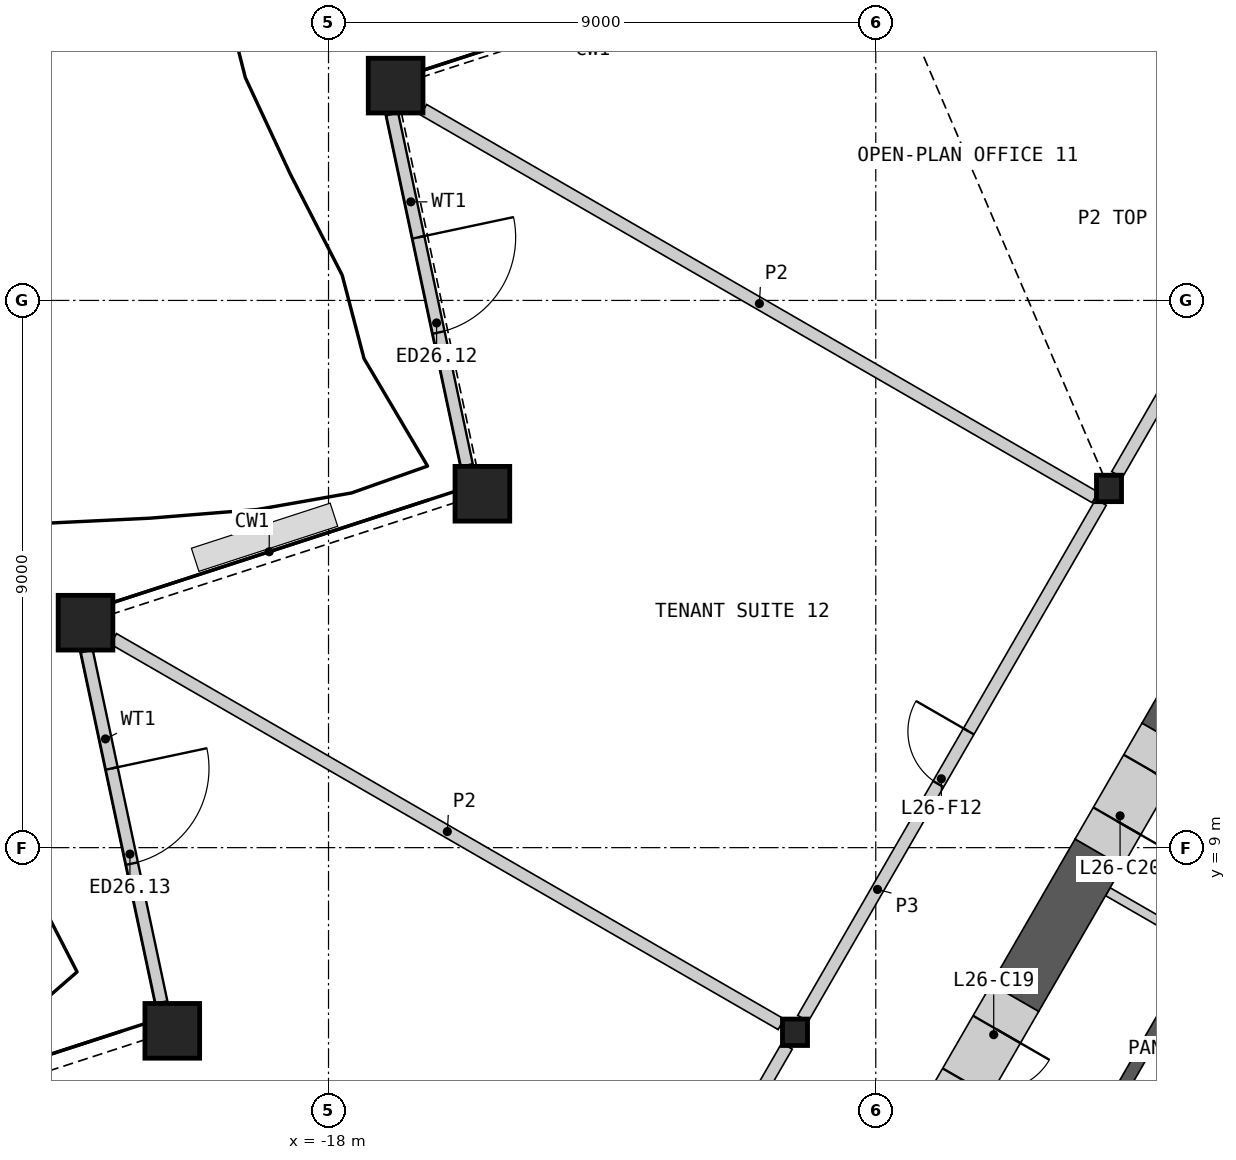
"""IFC4 building model, lengths in metres.
Left out: names, types, materials, properties, quantities, classifications, styles, units other than length and angle.
Written with IfcOpenShell. Run it as: python <this file> out.ifc"""

import sys

from ifc_helpers import new_model, si_unit, direction, frame, frame_2d, origin, origin_2d, place, context, subcontext, project, spatial, polyline, rectangle, hollow_rectangle, i_section, outline, extrude, element, fill, save


model = new_model("IFC4")
c1 = context("Model", 3, precision=1e-05, world=origin(), true_north=direction((0.0, 1.0)))
c2 = subcontext(c1, "Body", "Model", "MODEL_VIEW")
j1 = project(units=[si_unit("LENGTHUNIT", "METRE"), si_unit("PLANEANGLEUNIT", "RADIAN")], contexts=[c1])
p1 = place(None, origin())
s1 = spatial("IfcSite", under=j1, at=p1, CompositionType="ELEMENT")
p2 = place(p1, origin())
s2 = spatial("IfcBuilding", under=s1, at=p2, CompositionType="ELEMENT")
p3 = place(p2, frame((0.0, 0.0, 124.8)))
s3 = spatial("IfcBuildingStorey", under=s2, at=p3, CompositionType="ELEMENT", Elevation=124.8)
for number, where, z_axis, x_axis in (
    (1, (-16.896, 21.533, 0.0), (0.0, 0.0, 1.0), (1.0, 0.0, 0.0)),
    (2, (-15.469, 14.82, 0.0), (0.0, 0.0, 1.0), (1.0, 0.0, 0.0)),
    (3, (-21.996, 12.699, 0.0), (0.0, 0.0, 1.0), (1.0, 0.0, 0.0)),
    (4, (-20.57, 5.987, 0.0), (0.0, 0.0, 1.0), (1.0, 0.0, 0.0)),
):
    element("IfcColumn", number, at=place(p3, frame(where, z_axis=z_axis, x_axis=x_axis)), inside=s3, PredefinedType="COLUMN", context=c2, shape_type="SweptSolid", body=[
        extrude(hollow_rectangle(XDim=0.9, YDim=0.9, WallThickness=0.06, at=origin_2d()), origin(), (0.0, 0.0, 1.0), 4.2),
    ])
for number, where, z_axis, x_axis in (
    (5, (-5.164, 14.908, 0.0), (0.0, 0.0, 1.0), (1.0, 0.0, 0.0)),
    (6, (-10.328, 5.963, 0.0), (0.0, 0.0, 1.0), (1.0, 0.0, 0.0)),
):
    element("IfcColumn", number, at=place(p3, frame(where, z_axis=z_axis, x_axis=x_axis)), inside=s3, PredefinedType="COLUMN", context=c2, shape_type="SweptSolid", body=[
        extrude(i_section(OverallWidth=0.412, OverallDepth=0.435, WebThickness=0.036, FlangeThickness=0.057, at=origin_2d()), origin(), (0.0, 0.0, 1.0), 4.2),
    ])
p4 = place(p3, frame((-16.953, 21.066, 0.0), z_axis=(0.0, 0.0, 1.0), x_axis=(0.207917562075, -0.978146352741, 0.0)))
e7 = element("IfcWall", 7, at=p4, inside=s3, PredefinedType="SOLIDWALL", context=c2, shape_type="SweptSolid", body=[
    extrude(rectangle(XDim=5.909, YDim=0.2, at=frame_2d((2.954, 0.0))), origin(), (0.0, 0.0, 1.0), 3.189),
])
p5 = place(p4, frame((2.073, 0.0, 0.0)))
e8 = element("IfcOpeningElement", 8, at=p5, cuts=e7, PredefinedType="OPENING", context=c2, shape_type="SweptSolid", body=[
    extrude(rectangle(XDim=1.6, YDim=2.4, at=frame_2d((0.8, 1.2))), frame((0.0, 0.11, 0.0), z_axis=(0.0, -1.0, 0.0), x_axis=(1.0, 0.0, 0.0)), (0.0, 0.0, 1.0), 0.22),
])
p6 = place(p3, frame((-21.976, 12.233, 0.0), z_axis=(0.0, 0.0, 1.0), x_axis=(0.207925965623, -0.978144566421, 0.0)))
e9 = element("IfcWall", 9, at=p6, inside=s3, PredefinedType="SOLIDWALL", context=c2, shape_type="SweptSolid", body=[
    extrude(rectangle(XDim=5.908, YDim=0.2, at=frame_2d((2.954, 0.0))), origin(), (0.0, 0.0, 1.0), 3.189),
])
p7 = place(p6, frame((1.973, 0.0, 0.0)))
e10 = element("IfcOpeningElement", 10, at=p7, cuts=e9, PredefinedType="OPENING", context=c2, shape_type="SweptSolid", body=[
    extrude(rectangle(XDim=1.6, YDim=2.4, at=frame_2d((0.8, 1.2))), frame((0.0, 0.11, 0.0), z_axis=(0.0, -1.0, 0.0), x_axis=(1.0, 0.0, 0.0)), (0.0, 0.0, 1.0), 0.22),
])
p8 = place(p3, origin())
e11 = element("IfcWall", 11, at=p8, inside=s3, PredefinedType="SHEAR", context=c2, shape_type="SweptSolid", body=[
    extrude(outline(polyline([(-4.96, 0.208), (-7.131, 1.461), (-3.731, 7.35), (-1.561, 6.097), (-1.66, 5.924), (-3.652, 7.074), (-5.752, 3.437), (-3.76, 2.287), (-3.861, 2.113), (-5.852, 3.263), (-6.852, 1.531), (-4.861, 0.381), (-4.96, 0.208)])), origin(), (0.0, 0.0, 1.0), 3.8),
])
p9 = place(p3, frame((-1.631, 5.776, 0.0), z_axis=(0.0, 0.0, 1.0), x_axis=(-0.499992876559, -0.866029516466, 0.0)))
e12 = element("IfcWall", 12, at=p9, inside=s3, PredefinedType="SOLIDWALL", context=c2, shape_type="SweptSolid", body=[
    extrude(rectangle(XDim=6.486, YDim=0.2, at=frame_2d((3.243, 0.0))), origin(), (0.0, 0.0, 1.0), 3.8),
])
p10 = place(p9, frame((1.537, 0.0, 0.0)))
e13 = element("IfcOpeningElement", 13, at=p10, cuts=e12, PredefinedType="OPENING", context=c2, shape_type="SweptSolid", body=[
    extrude(rectangle(XDim=0.9, YDim=2.1, at=frame_2d((0.45, 1.05))), frame((0.0, 0.11, 0.0), z_axis=(0.0, -1.0, 0.0), x_axis=(1.0, 0.0, 0.0)), (0.0, 0.0, 1.0), 0.22),
])
p11 = place(p3, frame((-3.693, 7.415, 0.0), z_axis=(0.0, 0.0, 1.0), x_axis=(-0.866024871741, 0.500000921525, 0.0)))
e14 = element("IfcWall", 14, at=p11, inside=s3, PredefinedType="PARTITIONING", context=c2, shape_type="SweptSolid", body=[
    extrude(rectangle(XDim=1.72, YDim=0.15, at=frame_2d((0.86, 0.0))), origin(), (0.0, 0.0, 1.0), 3.8),
])
p12 = place(p3, frame((-0.39, 17.478, 0.0), z_axis=(0.0, 0.0, 1.0), x_axis=(-0.500010285023, -0.866019465642, 0.0)))
e15 = element("IfcWall", 15, at=p12, inside=s3, PredefinedType="SHEAR", context=c2, shape_type="SweptSolid", body=[
    extrude(rectangle(XDim=7.685, YDim=0.9, at=frame_2d((3.842, 0.0))), origin(), (0.0, 0.0, 1.0), 3.8),
])
p13 = place(p3, frame((-5.332, 8.917, 0.0), z_axis=(0.0, 0.0, 1.0), x_axis=(-0.499949934511, -0.866054307178, 0.0)))
e16 = element("IfcWall", 16, at=p13, inside=s3, PredefinedType="SHEAR", context=c2, shape_type="SweptSolid", body=[
    extrude(rectangle(XDim=2.756, YDim=0.9, at=frame_2d((1.378, 0.0))), origin(), (0.0, 0.0, 1.0), 3.8),
])
p14 = place(p3, frame((-6.71, 6.53, 0.0), z_axis=(0.0, 0.0, 1.0), x_axis=(-0.50002983664, -0.866008176907, 0.0)))
e17 = element("IfcWall", 17, at=p14, inside=s3, PredefinedType="SHEAR", context=c2, shape_type="SweptSolid", body=[
    extrude(rectangle(XDim=2.2, YDim=0.9, at=frame_2d((1.1, 0.0))), origin(), (0.0, 0.0, 1.0), 3.8),
])
p15 = place(p14, frame((0.6, 0.0, 0.0)))
e18 = element("IfcOpeningElement", 18, at=p15, cuts=e17, PredefinedType="OPENING", context=c2, shape_type="SweptSolid", body=[
    extrude(rectangle(XDim=1.0, YDim=2.1, at=frame_2d((0.5, 1.05))), frame((0.0, 0.46, 0.0), z_axis=(0.0, -1.0, 0.0), x_axis=(1.0, 0.0, 0.0)), (0.0, 0.0, 1.0), 0.92),
])
p16 = place(p3, frame((-4.232, 10.822, 0.0), z_axis=(0.0, 0.0, 1.0), x_axis=(-0.50002983664, -0.866008176907, 0.0)))
e19 = element("IfcWall", 19, at=p16, inside=s3, PredefinedType="SHEAR", context=c2, shape_type="SweptSolid", body=[
    extrude(rectangle(XDim=2.2, YDim=0.9, at=frame_2d((1.1, 0.0))), origin(), (0.0, 0.0, 1.0), 3.8),
])
p17 = place(p16, frame((0.6, 0.0, 0.0)))
e20 = element("IfcOpeningElement", 20, at=p17, cuts=e19, PredefinedType="OPENING", context=c2, shape_type="SweptSolid", body=[
    extrude(rectangle(XDim=1.0, YDim=2.1, at=frame_2d((0.5, 1.05))), frame((0.0, 0.46, 0.0), z_axis=(0.0, -1.0, 0.0), x_axis=(1.0, 0.0, 0.0)), (0.0, 0.0, 1.0), 0.92),
])
p18 = place(p3, frame((-15.361, -2.754, 0.0), z_axis=(0.0, 0.0, 1.0), x_axis=(0.500004141693, 0.866023012564, 0.0)))
e21 = element("IfcWall", 21, at=p18, inside=s3, PredefinedType="PARTITIONING", context=c2, shape_type="SweptSolid", body=[
    extrude(rectangle(XDim=9.803, YDim=0.2, at=frame_2d((4.902, 0.0))), origin(), (0.0, 0.0, 1.0), 3.8),
])
p19 = place(p18, frame((4.452, 0.0, 0.0)))
e22 = element("IfcOpeningElement", 22, at=p19, cuts=e21, PredefinedType="OPENING", context=c2, shape_type="SweptSolid", body=[
    extrude(rectangle(XDim=1.0, YDim=2.1, at=frame_2d((0.5, 1.05))), frame((0.0, 0.11, 0.0), z_axis=(0.0, -1.0, 0.0), x_axis=(1.0, 0.0, 0.0)), (0.0, 0.0, 1.0), 0.22),
])
p20 = place(p3, frame((-10.197, 6.19, 0.0), z_axis=(0.0, 0.0, 1.0), x_axis=(0.500012035596, 0.866018454918, 0.0)))
e23 = element("IfcWall", 23, at=p20, inside=s3, PredefinedType="PARTITIONING", context=c2, shape_type="SweptSolid", body=[
    extrude(rectangle(XDim=9.803, YDim=0.2, at=frame_2d((4.902, 0.0))), origin(), (0.0, 0.0, 1.0), 3.8),
])
p21 = place(p20, frame((4.452, 0.0, 0.0)))
e24 = element("IfcOpeningElement", 24, at=p21, cuts=e23, PredefinedType="OPENING", context=c2, shape_type="SweptSolid", body=[
    extrude(rectangle(XDim=1.0, YDim=2.1, at=frame_2d((0.5, 1.05))), frame((0.0, 0.11, 0.0), z_axis=(0.0, -1.0, 0.0), x_axis=(1.0, 0.0, 0.0)), (0.0, 0.0, 1.0), 0.22),
])
p22 = place(p3, frame((-5.033, 15.135, 0.0), z_axis=(0.0, 0.0, 1.0), x_axis=(0.499980978912, 0.866036385336, 0.0)))
e25 = element("IfcWall", 25, at=p22, inside=s3, PredefinedType="PARTITIONING", context=c2, shape_type="SweptSolid", body=[
    extrude(rectangle(XDim=6.24, YDim=0.2, at=frame_2d((3.12, 0.0))), origin(), (0.0, 0.0, 1.0), 3.8),
])
p23 = place(p22, frame((2.57, 0.0, 0.0)))
e26 = element("IfcOpeningElement", 26, at=p23, cuts=e25, PredefinedType="OPENING", context=c2, shape_type="SweptSolid", body=[
    extrude(rectangle(XDim=1.0, YDim=2.1, at=frame_2d((0.5, 1.05))), frame((0.0, 0.11, 0.0), z_axis=(0.0, -1.0, 0.0), x_axis=(1.0, 0.0, 0.0)), (0.0, 0.0, 1.0), 0.22),
])
p24 = place(p3, frame((-11.737, 29.906, 0.0), z_axis=(0.0, 0.0, 1.0), x_axis=(0.718783474817, -0.695234001132, 0.0)))
e27 = element("IfcWall", 27, at=p24, inside=s3, PredefinedType="PARTITIONING", context=c2, shape_type="SweptSolid", body=[
    extrude(rectangle(XDim=13.498, YDim=0.2, at=frame_2d((6.749, 0.0))), origin(), (0.0, 0.0, 1.0), 2.885),
])
p25 = place(p3, frame((-16.436, 21.137, 0.0), z_axis=(0.0, 0.0, 1.0), x_axis=(0.866023321739, -0.500003606191, 0.0)))
e28 = element("IfcWall", 28, at=p25, inside=s3, PredefinedType="PARTITIONING", context=c2, shape_type="SweptSolid", body=[
    extrude(rectangle(XDim=12.753, YDim=0.2, at=frame_2d((6.377, 0.0))), origin(), (0.0, 0.0, 1.0), 2.885),
])
p26 = place(p3, frame((-21.536, 12.434, 0.0), z_axis=(0.0, 0.0, 1.0), x_axis=(0.86602461759, -0.500001361726, 0.0)))
e29 = element("IfcWall", 29, at=p26, inside=s3, PredefinedType="PARTITIONING", context=c2, shape_type="SweptSolid", body=[
    extrude(rectangle(XDim=12.679, YDim=0.2, at=frame_2d((6.34, 0.0))), origin(), (0.0, 0.0, 1.0), 2.885),
])
p27 = place(p5, origin())
e30 = element("IfcDoor", 30, at=p27, inside=s3, OperationType="DOUBLE_DOOR_SINGLE_SWING", PredefinedType="DOOR", context=c2, shape_type="SweptSolid", body=[
    extrude(rectangle(XDim=1.6, YDim=2.4, at=frame_2d((0.8, 1.2))), frame((0.0, 0.025, 0.0), z_axis=(0.0, -1.0, 0.0), x_axis=(1.0, 0.0, 0.0)), (0.0, 0.0, 1.0), 0.05),
])
fill(e8, e30)
p28 = place(p7, origin())
e31 = element("IfcDoor", 31, at=p28, inside=s3, OperationType="DOUBLE_DOOR_SINGLE_SWING", PredefinedType="DOOR", context=c2, shape_type="SweptSolid", body=[
    extrude(rectangle(XDim=1.6, YDim=2.4, at=frame_2d((0.8, 1.2))), frame((0.0, 0.025, 0.0), z_axis=(0.0, -1.0, 0.0), x_axis=(1.0, 0.0, 0.0)), (0.0, 0.0, 1.0), 0.05),
])
fill(e10, e31)
p29 = place(p15, origin())
e32 = element("IfcDoor", 32, at=p29, inside=s3, OperationType="SINGLE_SWING_LEFT", PredefinedType="DOOR", context=c2, shape_type="SweptSolid", body=[
    extrude(rectangle(XDim=1.0, YDim=2.1, at=frame_2d((0.5, 1.05))), frame((0.0, 0.205, 0.0), z_axis=(0.0, -1.0, 0.0), x_axis=(1.0, 0.0, 0.0)), (0.0, 0.0, 1.0), 0.05),
])
fill(e18, e32)
p30 = place(p17, origin())
e33 = element("IfcDoor", 33, at=p30, inside=s3, OperationType="SINGLE_SWING_RIGHT", PredefinedType="DOOR", context=c2, shape_type="SweptSolid", body=[
    extrude(rectangle(XDim=1.0, YDim=2.1, at=frame_2d((0.5, 1.05))), frame((0.0, 0.205, 0.0), z_axis=(0.0, -1.0, 0.0), x_axis=(1.0, 0.0, 0.0)), (0.0, 0.0, 1.0), 0.05),
])
fill(e20, e33)
p31 = place(p21, origin())
e34 = element("IfcDoor", 34, at=p31, inside=s3, OperationType="SINGLE_SWING_RIGHT", PredefinedType="DOOR", context=c2, shape_type="SweptSolid", body=[
    extrude(rectangle(XDim=1.0, YDim=2.1, at=frame_2d((0.5, 1.05))), frame((0.0, 0.025, 0.0), z_axis=(0.0, -1.0, 0.0), x_axis=(1.0, 0.0, 0.0)), (0.0, 0.0, 1.0), 0.05),
])
fill(e24, e34)
save(model, sys.argv[1])
